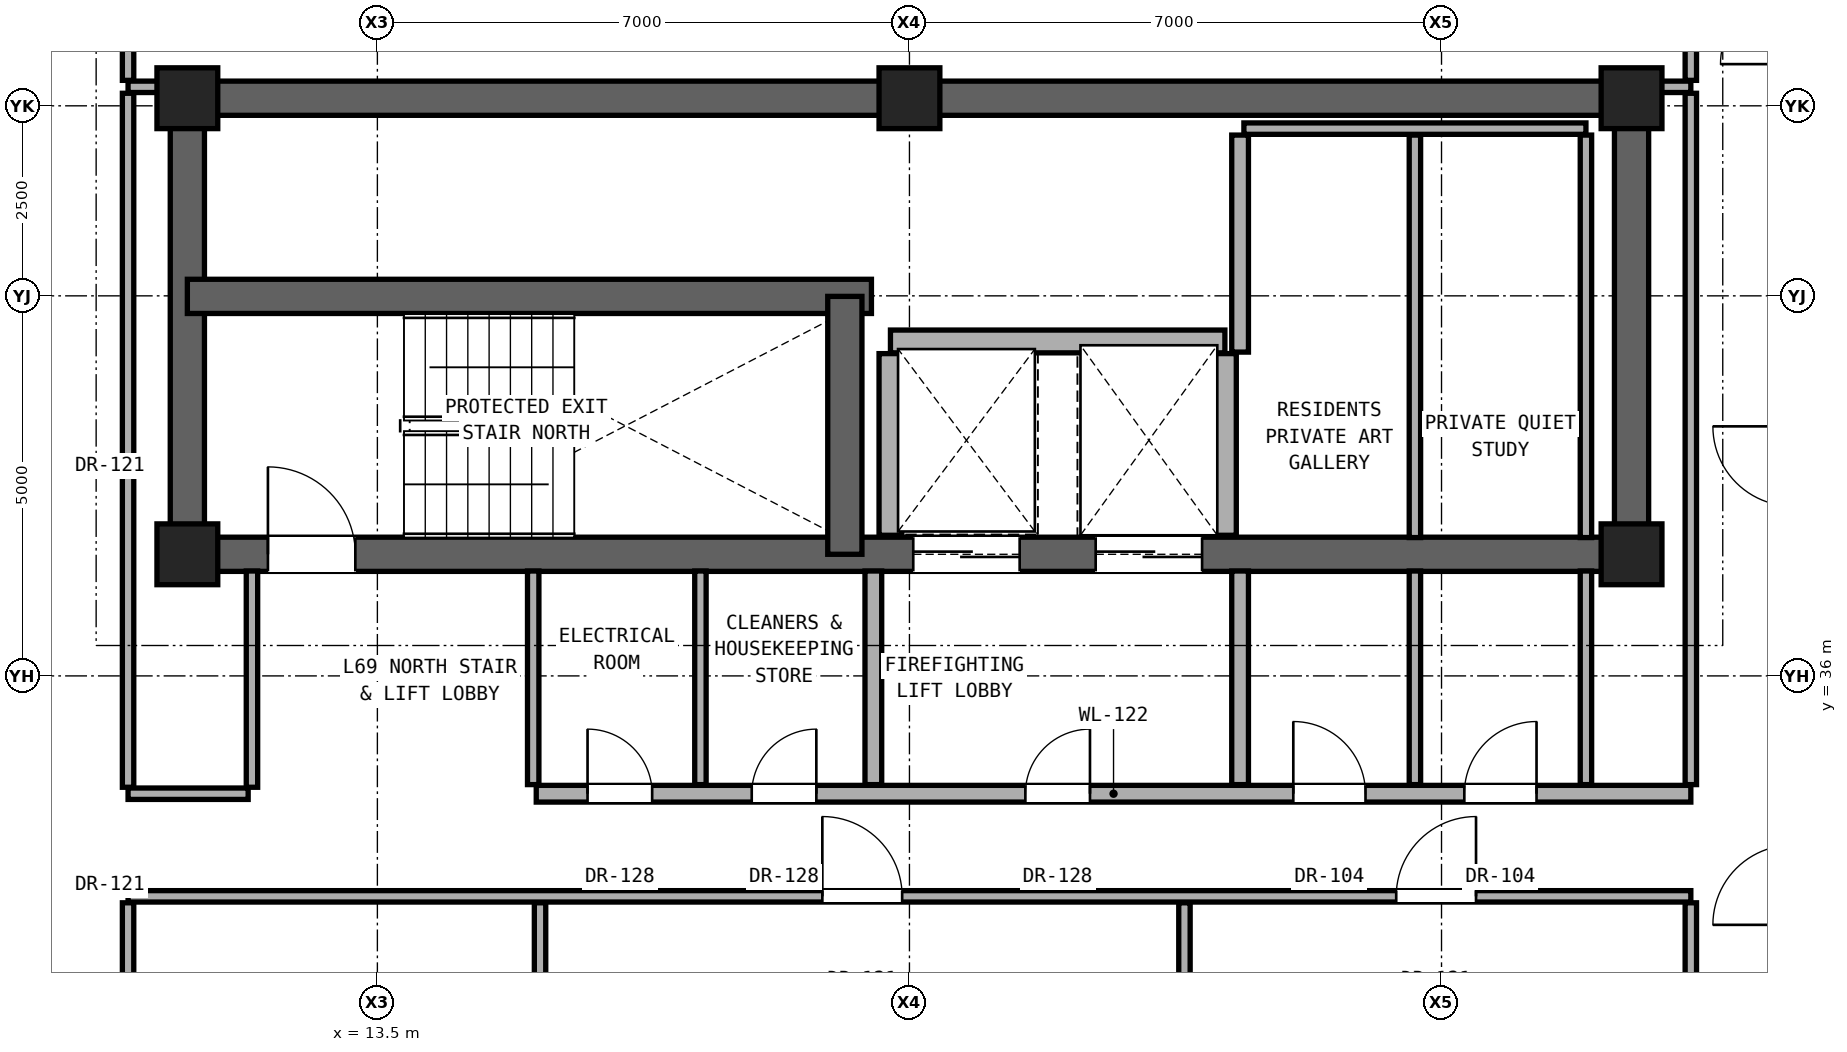
"""IFC4 building model, lengths in metres.
Left out: names, types, materials, properties, quantities, classifications, styles, units other than length and angle.
Written with IfcOpenShell. Run it as: python <this file> out.ifc"""

import sys

from ifc_helpers import new_model, si_unit, direction, frame, frame_2d, origin, origin_2d, place, context, subcontext, project, spatial, rectangle, extrude, element, fill, save


model = new_model("IFC4")
c1 = context("Model", 3, precision=1e-05, world=origin(), true_north=direction((0.0, 1.0)))
c2 = subcontext(c1, "Body", "Model", "MODEL_VIEW")
j1 = project(units=[si_unit("LENGTHUNIT", "METRE"), si_unit("PLANEANGLEUNIT", "RADIAN")], contexts=[c1])
p1 = place(None, origin())
s1 = spatial("IfcSite", under=j1, at=p1, CompositionType="ELEMENT")
p2 = place(p1, origin())
s2 = spatial("IfcBuilding", under=s1, at=p2, CompositionType="ELEMENT")
p3 = place(p2, frame((0.0, 0.0, 242.5)))
s3 = spatial("IfcBuildingStorey", under=s2, at=p3, CompositionType="ELEMENT", Elevation=242.5)
for number, where, z_axis, x_axis in (
    (1, (11.0, 37.6, 0.0), (0.0, 0.0, 1.0), (1.0, 0.0, 0.0)),
    (2, (30.0, 37.6, 0.0), (0.0, 0.0, 1.0), (1.0, 0.0, 0.0)),
    (3, (11.0, 43.6, 0.0), (0.0, 0.0, 1.0), (1.0, 0.0, 0.0)),
    (4, (20.5, 43.6, 0.0), (0.0, 0.0, 1.0), (1.0, 0.0, 0.0)),
    (5, (30.0, 43.6, 0.0), (0.0, 0.0, 1.0), (1.0, 0.0, 0.0)),
):
    element("IfcColumn", number, at=place(p3, frame(where, z_axis=z_axis, x_axis=x_axis)), inside=s3, PredefinedType="COLUMN", context=c2, shape_type="SweptSolid", body=[
        extrude(rectangle(XDim=0.8, YDim=0.8, at=origin_2d()), origin(), (0.0, 0.0, 1.0), 3.3),
    ])
p4 = place(p3, frame((11.0, 43.6, 0.0), z_axis=(0.0, 0.0, 1.0), x_axis=(1.0, 0.0, 0.0)))
e6 = element("IfcWall", 6, at=p4, inside=s3, PredefinedType="SHEAR", context=c2, shape_type="SweptSolid", body=[
    extrude(rectangle(XDim=19.0, YDim=0.45, at=frame_2d((9.5, 0.0))), origin(), (0.0, 0.0, 1.0), 3.1),
])
for number, where, z_axis, x_axis in (
    (7, (11.0, 37.6, 0.0), (0.0, 0.0, 1.0), (0.0, 1.0, 0.0)),
    (8, (30.0, 37.6, 0.0), (0.0, 0.0, 1.0), (0.0, 1.0, 0.0)),
):
    element("IfcWall", number, at=place(p3, frame(where, z_axis=z_axis, x_axis=x_axis)), inside=s3, PredefinedType="SHEAR", context=c2, shape_type="SweptSolid", body=[
        extrude(rectangle(XDim=6.0, YDim=0.45, at=frame_2d((3.0, 0.0))), origin(), (0.0, 0.0, 1.0), 3.1),
    ])
p5 = place(p3, frame((11.0, 37.6, 0.0), z_axis=(0.0, 0.0, 1.0), x_axis=(1.0, 0.0, 0.0)))
e9 = element("IfcWall", 9, at=p5, inside=s3, PredefinedType="SHEAR", context=c2, shape_type="SweptSolid", body=[
    extrude(rectangle(XDim=19.0, YDim=0.45, at=frame_2d((9.5, 0.0))), origin(), (0.0, 0.0, 1.0), 3.1),
])
p6 = place(p5, frame((1.06, 0.0, 0.0)))
e10 = element("IfcOpeningElement", 10, at=p6, cuts=e9, PredefinedType="OPENING", context=c2, shape_type="SweptSolid", body=[
    extrude(rectangle(XDim=1.15, YDim=2.2, at=frame_2d((0.575, 1.1))), frame((0.0, 0.235, 0.0), z_axis=(0.0, -1.0, 0.0), x_axis=(1.0, 0.0, 0.0)), (0.0, 0.0, 1.0), 0.47),
])
p7 = place(p5, frame((9.55, 0.0, 0.0)))
e11 = element("IfcOpeningElement", 11, at=p7, cuts=e9, PredefinedType="OPENING", context=c2, shape_type="SweptSolid", body=[
    extrude(rectangle(XDim=1.4, YDim=2.35, at=frame_2d((0.7, 1.175))), frame((0.0, 0.235, 0.0), z_axis=(0.0, -1.0, 0.0), x_axis=(1.0, 0.0, 0.0)), (0.0, 0.0, 1.0), 0.47),
])
p8 = place(p5, frame((11.95, 0.0, 0.0)))
e12 = element("IfcOpeningElement", 12, at=p8, cuts=e9, PredefinedType="OPENING", context=c2, shape_type="SweptSolid", body=[
    extrude(rectangle(XDim=1.4, YDim=2.35, at=frame_2d((0.7, 1.175))), frame((0.0, 0.235, 0.0), z_axis=(0.0, -1.0, 0.0), x_axis=(1.0, 0.0, 0.0)), (0.0, 0.0, 1.0), 0.47),
])
p9 = place(p3, frame((11.0, 40.993, 0.0), z_axis=(0.0, 0.0, 1.0), x_axis=(1.0, 0.0, 0.0)))
e13 = element("IfcWall", 13, at=p9, inside=s3, PredefinedType="SHEAR", context=c2, shape_type="SweptSolid", body=[
    extrude(rectangle(XDim=9.0, YDim=0.45, at=frame_2d((4.5, 0.0))), origin(), (0.0, 0.0, 1.0), 3.1),
])
p10 = place(p3, frame((19.65, 37.6, 0.0), z_axis=(0.0, 0.0, 1.0), x_axis=(0.0, 1.0, 0.0)))
e14 = element("IfcWall", 14, at=p10, inside=s3, PredefinedType="SHEAR", context=c2, shape_type="SweptSolid", body=[
    extrude(rectangle(XDim=3.393, YDim=0.45, at=frame_2d((1.696, 0.0))), origin(), (0.0, 0.0, 1.0), 3.1),
])
p11 = place(p3, frame((10.22, 33.1, 0.0), z_axis=(0.0, 0.0, 1.0), x_axis=(1.0, 0.0, 0.0)))
e15 = element("IfcWall", 15, at=p11, inside=s3, PredefinedType="PARTITIONING", context=c2, shape_type="SweptSolid", body=[
    extrude(rectangle(XDim=20.56, YDim=0.15, at=frame_2d((10.28, 0.0))), origin(), (0.0, 0.0, 1.0), 2.236),
])
p12 = place(p11, frame((9.134, 0.0, 0.0)))
e16 = element("IfcOpeningElement", 16, at=p12, cuts=e15, PredefinedType="OPENING", context=c2, shape_type="SweptSolid", body=[
    extrude(rectangle(XDim=1.05, YDim=2.2, at=frame_2d((0.525, 1.1))), frame((0.0, 0.085, 0.0), z_axis=(0.0, -1.0, 0.0), x_axis=(1.0, 0.0, 0.0)), (0.0, 0.0, 1.0), 0.17),
])
p13 = place(p11, frame((16.684, 0.0, 0.0)))
e17 = element("IfcOpeningElement", 17, at=p13, cuts=e15, PredefinedType="OPENING", context=c2, shape_type="SweptSolid", body=[
    extrude(rectangle(XDim=1.05, YDim=2.2, at=frame_2d((0.525, 1.1))), frame((0.0, 0.085, 0.0), z_axis=(0.0, -1.0, 0.0), x_axis=(1.0, 0.0, 0.0)), (0.0, 0.0, 1.0), 0.17),
])
p14 = place(p3, frame((10.22, 34.45, 0.0), z_axis=(0.0, 0.0, 1.0), x_axis=(1.0, 0.0, 0.0)))
e18 = element("IfcWall", 18, at=p14, inside=s3, PredefinedType="PARTITIONING", context=c2, shape_type="SweptSolid", body=[
    extrude(rectangle(XDim=1.58, YDim=0.15, at=frame_2d((0.79, 0.0))), origin(), (0.0, 0.0, 1.0), 2.236),
])
p15 = place(p3, frame((15.59, 34.45, 0.0), z_axis=(0.0, 0.0, 1.0), x_axis=(1.0, 0.0, 0.0)))
e19 = element("IfcWall", 19, at=p15, inside=s3, PredefinedType="SOLIDWALL", context=c2, shape_type="SweptSolid", body=[
    extrude(rectangle(XDim=15.19, YDim=0.22, at=frame_2d((7.595, 0.0))), origin(), (0.0, 0.0, 1.0), 2.236),
])
p16 = place(p15, frame((6.435, 0.0, 0.0)))
e20 = element("IfcOpeningElement", 20, at=p16, cuts=e19, PredefinedType="OPENING", context=c2, shape_type="SweptSolid", body=[
    extrude(rectangle(XDim=0.85, YDim=2.01, at=frame_2d((0.425, 1.005))), frame((0.0, 0.12, 0.0), z_axis=(0.0, -1.0, 0.0), x_axis=(1.0, 0.0, 0.0)), (0.0, 0.0, 1.0), 0.24),
])
p17 = place(p15, frame((9.96, 0.0, 0.0)))
e21 = element("IfcOpeningElement", 21, at=p17, cuts=e19, PredefinedType="OPENING", context=c2, shape_type="SweptSolid", body=[
    extrude(rectangle(XDim=0.95, YDim=2.15, at=frame_2d((0.475, 1.075))), frame((0.0, 0.12, 0.0), z_axis=(0.0, -1.0, 0.0), x_axis=(1.0, 0.0, 0.0)), (0.0, 0.0, 1.0), 0.24),
])
p18 = place(p15, frame((12.21, 0.0, 0.0)))
e22 = element("IfcOpeningElement", 22, at=p18, cuts=e19, PredefinedType="OPENING", context=c2, shape_type="SweptSolid", body=[
    extrude(rectangle(XDim=0.95, YDim=2.15, at=frame_2d((0.475, 1.075))), frame((0.0, 0.12, 0.0), z_axis=(0.0, -1.0, 0.0), x_axis=(1.0, 0.0, 0.0)), (0.0, 0.0, 1.0), 0.24),
])
p19 = place(p15, frame((0.675, 0.0, 0.0)))
e23 = element("IfcOpeningElement", 23, at=p19, cuts=e19, PredefinedType="OPENING", context=c2, shape_type="SweptSolid", body=[
    extrude(rectangle(XDim=0.85, YDim=2.01, at=frame_2d((0.425, 1.005))), frame((0.0, 0.12, 0.0), z_axis=(0.0, -1.0, 0.0), x_axis=(1.0, 0.0, 0.0)), (0.0, 0.0, 1.0), 0.24),
])
p20 = place(p15, frame((2.835, 0.0, 0.0)))
e24 = element("IfcOpeningElement", 24, at=p20, cuts=e19, PredefinedType="OPENING", context=c2, shape_type="SweptSolid", body=[
    extrude(rectangle(XDim=0.85, YDim=2.01, at=frame_2d((0.425, 1.005))), frame((0.0, 0.12, 0.0), z_axis=(0.0, -1.0, 0.0), x_axis=(1.0, 0.0, 0.0)), (0.0, 0.0, 1.0), 0.24),
])
p21 = place(p3, frame((20.25, 40.4, 0.0), z_axis=(0.0, 0.0, 1.0), x_axis=(1.0, 0.0, 0.0)))
e25 = element("IfcWall", 25, at=p21, inside=s3, PredefinedType="SOLIDWALL", context=c2, shape_type="SweptSolid", body=[
    extrude(rectangle(XDim=4.4, YDim=0.3, at=frame_2d((2.2, 0.0))), origin(), (0.0, 0.0, 1.0), 3.1),
])
p22 = place(p3, frame((24.9, 43.2, 0.0), z_axis=(0.0, 0.0, 1.0), x_axis=(1.0, 0.0, 0.0)))
e26 = element("IfcWall", 26, at=p22, inside=s3, PredefinedType="PARTITIONING", context=c2, shape_type="SweptSolid", body=[
    extrude(rectangle(XDim=4.5, YDim=0.15, at=frame_2d((2.25, 0.0))), origin(), (0.0, 0.0, 1.0), 3.1),
])
for number, where, z_axis, x_axis in (
    (27, (10.22, 43.75, 0.0), (0.0, 0.0, 1.0), (1.0, 0.0, 0.0)),
    (28, (30.22, 43.75, 0.0), (0.0, 0.0, 1.0), (1.0, 0.0, 0.0)),
):
    element("IfcWall", number, at=place(p3, frame(where, z_axis=z_axis, x_axis=x_axis)), inside=s3, PredefinedType="PARTITIONING", context=c2, shape_type="SweptSolid", body=[
        extrude(rectangle(XDim=0.56, YDim=0.15, at=frame_2d((0.28, 0.0))), origin(), (0.0, 0.0, 1.0), 3.1),
    ])
p23 = place(p3, frame((10.22, 22.935, 0.0), z_axis=(0.0, 0.0, 1.0), x_axis=(0.0, 1.0, 0.0)))
e29 = element("IfcWall", 29, at=p23, inside=s3, PredefinedType="PARTITIONING", context=c2, shape_type="SweptSolid", body=[
    extrude(rectangle(XDim=10.08, YDim=0.15, at=frame_2d((5.04, 0.0))), origin(), (0.0, 0.0, 1.0), 2.396),
])
p24 = place(p23, frame((4.565, 0.0, 0.0)))
e30 = element("IfcOpeningElement", 30, at=p24, cuts=e29, PredefinedType="OPENING", context=c2, shape_type="SweptSolid", body=[
    extrude(rectangle(XDim=0.95, YDim=2.15, at=frame_2d((0.475, 1.075))), frame((0.0, 0.085, 0.0), z_axis=(0.0, -1.0, 0.0), x_axis=(1.0, 0.0, 0.0)), (0.0, 0.0, 1.0), 0.17),
])
p25 = place(p3, frame((10.22, 34.535, 0.0), z_axis=(0.0, 0.0, 1.0), x_axis=(0.0, 1.0, 0.0)))
e31 = element("IfcWall", 31, at=p25, inside=s3, PredefinedType="PARTITIONING", context=c2, shape_type="SweptSolid", body=[
    extrude(rectangle(XDim=9.13, YDim=0.15, at=frame_2d((4.565, 0.0))), origin(), (0.0, 0.0, 1.0), 2.492),
])
p26 = place(p3, frame((10.22, 43.835, 0.0), z_axis=(0.0, 0.0, 1.0), x_axis=(0.0, 1.0, 0.0)))
e32 = element("IfcWall", 32, at=p26, inside=s3, PredefinedType="PARTITIONING", context=c2, shape_type="SweptSolid", body=[
    extrude(rectangle(XDim=3.291, YDim=0.15, at=frame_2d((1.646, 0.0))), origin(), (0.0, 0.0, 1.0), 3.1),
])
p27 = place(p3, frame((11.85, 34.535, 0.0), z_axis=(0.0, 0.0, 1.0), x_axis=(0.0, 1.0, 0.0)))
e33 = element("IfcWall", 33, at=p27, inside=s3, PredefinedType="PARTITIONING", context=c2, shape_type="SweptSolid", body=[
    extrude(rectangle(XDim=2.845, YDim=0.15, at=frame_2d((1.422, 0.0))), origin(), (0.0, 0.0, 1.0), 3.1),
])
p28 = place(p3, frame((15.64, 25.925, 0.0), z_axis=(0.0, 0.0, 1.0), x_axis=(0.0, 1.0, 0.0)))
e34 = element("IfcWall", 34, at=p28, inside=s3, PredefinedType="PARTITIONING", context=c2, shape_type="SweptSolid", body=[
    extrude(rectangle(XDim=7.09, YDim=0.15, at=frame_2d((3.545, 0.0))), origin(), (0.0, 0.0, 1.0), 2.236),
])
for number, where, z_axis, x_axis in (
    (35, (15.55, 34.57, 0.0), (0.0, 0.0, 1.0), (0.0, 1.0, 0.0)),
    (36, (17.75, 34.57, 0.0), (0.0, 0.0, 1.0), (0.0, 1.0, 0.0)),
):
    element("IfcWall", number, at=place(p3, frame(where, z_axis=z_axis, x_axis=x_axis)), inside=s3, PredefinedType="PARTITIONING", context=c2, shape_type="SweptSolid", body=[
        extrude(rectangle(XDim=2.81, YDim=0.15, at=frame_2d((1.405, 0.0))), origin(), (0.0, 0.0, 1.0), 3.1),
    ])
p29 = place(p3, frame((20.025, 34.57, 0.0), z_axis=(0.0, 0.0, 1.0), x_axis=(0.0, 1.0, 0.0)))
e37 = element("IfcWall", 37, at=p29, inside=s3, PredefinedType="SOLIDWALL", context=c2, shape_type="SweptSolid", body=[
    extrude(rectangle(XDim=2.81, YDim=0.22, at=frame_2d((1.405, 0.0))), origin(), (0.0, 0.0, 1.0), 3.1),
])
p30 = place(p3, frame((20.25, 37.85, 0.0), z_axis=(0.0, 0.0, 1.0), x_axis=(0.0, 1.0, 0.0)))
e38 = element("IfcWall", 38, at=p30, inside=s3, PredefinedType="SOLIDWALL", context=c2, shape_type="SweptSolid", body=[
    extrude(rectangle(XDim=2.39, YDim=0.3, at=frame_2d((1.195, 0.0))), origin(), (0.0, 0.0, 1.0), 3.1),
])
p31 = place(p3, frame((24.118, 25.925, 0.0), z_axis=(0.0, 0.0, 1.0), x_axis=(0.0, 1.0, 0.0)))
e39 = element("IfcWall", 39, at=p31, inside=s3, PredefinedType="PARTITIONING", context=c2, shape_type="SweptSolid", body=[
    extrude(rectangle(XDim=7.09, YDim=0.15, at=frame_2d((3.545, 0.0))), origin(), (0.0, 0.0, 1.0), 2.236),
])
p32 = place(p3, frame((24.65, 37.85, 0.0), z_axis=(0.0, 0.0, 1.0), x_axis=(0.0, 1.0, 0.0)))
e40 = element("IfcWall", 40, at=p32, inside=s3, PredefinedType="SOLIDWALL", context=c2, shape_type="SweptSolid", body=[
    extrude(rectangle(XDim=2.39, YDim=0.3, at=frame_2d((1.195, 0.0))), origin(), (0.0, 0.0, 1.0), 3.1),
])
p33 = place(p3, frame((24.85, 34.57, 0.0), z_axis=(0.0, 0.0, 1.0), x_axis=(0.0, 1.0, 0.0)))
e41 = element("IfcWall", 41, at=p33, inside=s3, PredefinedType="SOLIDWALL", context=c2, shape_type="SweptSolid", body=[
    extrude(rectangle(XDim=2.81, YDim=0.22, at=frame_2d((1.405, 0.0))), origin(), (0.0, 0.0, 1.0), 3.1),
])
p34 = place(p3, frame((24.85, 40.26, 0.0), z_axis=(0.0, 0.0, 1.0), x_axis=(0.0, 1.0, 0.0)))
e42 = element("IfcWall", 42, at=p34, inside=s3, PredefinedType="SOLIDWALL", context=c2, shape_type="SweptSolid", body=[
    extrude(rectangle(XDim=2.855, YDim=0.22, at=frame_2d((1.427, 0.0))), origin(), (0.0, 0.0, 1.0), 3.1),
])
p35 = place(p3, frame((27.15, 34.57, 0.0), z_axis=(0.0, 0.0, 1.0), x_axis=(0.0, 1.0, 0.0)))
e43 = element("IfcWall", 43, at=p35, inside=s3, PredefinedType="PARTITIONING", context=c2, shape_type="SweptSolid", body=[
    extrude(rectangle(XDim=2.81, YDim=0.15, at=frame_2d((1.405, 0.0))), origin(), (0.0, 0.0, 1.0), 3.1),
])
p36 = place(p3, frame((27.15, 37.82, 0.0), z_axis=(0.0, 0.0, 1.0), x_axis=(0.0, 1.0, 0.0)))
e44 = element("IfcWall", 44, at=p36, inside=s3, PredefinedType="PARTITIONING", context=c2, shape_type="SweptSolid", body=[
    extrude(rectangle(XDim=5.295, YDim=0.15, at=frame_2d((2.647, 0.0))), origin(), (0.0, 0.0, 1.0), 3.1),
])
p37 = place(p3, frame((29.4, 34.57, 0.0), z_axis=(0.0, 0.0, 1.0), x_axis=(0.0, 1.0, 0.0)))
e45 = element("IfcWall", 45, at=p37, inside=s3, PredefinedType="PARTITIONING", context=c2, shape_type="SweptSolid", body=[
    extrude(rectangle(XDim=2.81, YDim=0.15, at=frame_2d((1.405, 0.0))), origin(), (0.0, 0.0, 1.0), 3.1),
])
p38 = place(p3, frame((29.4, 37.82, 0.0), z_axis=(0.0, 0.0, 1.0), x_axis=(0.0, 1.0, 0.0)))
e46 = element("IfcWall", 46, at=p38, inside=s3, PredefinedType="PARTITIONING", context=c2, shape_type="SweptSolid", body=[
    extrude(rectangle(XDim=5.295, YDim=0.15, at=frame_2d((2.647, 0.0))), origin(), (0.0, 0.0, 1.0), 3.1),
])
p39 = place(p3, frame((30.78, 25.925, 0.0), z_axis=(0.0, 0.0, 1.0), x_axis=(0.0, 1.0, 0.0)))
e47 = element("IfcWall", 47, at=p39, inside=s3, PredefinedType="PARTITIONING", context=c2, shape_type="SweptSolid", body=[
    extrude(rectangle(XDim=7.09, YDim=0.15, at=frame_2d((3.545, 0.0))), origin(), (0.0, 0.0, 1.0), 2.396),
])
p40 = place(p3, frame((30.78, 34.57, 0.0), z_axis=(0.0, 0.0, 1.0), x_axis=(0.0, 1.0, 0.0)))
e48 = element("IfcWall", 48, at=p40, inside=s3, PredefinedType="PARTITIONING", context=c2, shape_type="SweptSolid", body=[
    extrude(rectangle(XDim=9.095, YDim=0.15, at=frame_2d((4.547, 0.0))), origin(), (0.0, 0.0, 1.0), 2.492),
])
p41 = place(p3, frame((30.78, 43.835, 0.0), z_axis=(0.0, 0.0, 1.0), x_axis=(0.0, 1.0, 0.0)))
e49 = element("IfcWall", 49, at=p41, inside=s3, PredefinedType="PARTITIONING", context=c2, shape_type="SweptSolid", body=[
    extrude(rectangle(XDim=3.291, YDim=0.15, at=frame_2d((1.646, 0.0))), origin(), (0.0, 0.0, 1.0), 3.1),
])
p42 = place(p41, frame((1.121, 0.0, 0.0)))
e50 = element("IfcOpeningElement", 50, at=p42, cuts=e49, PredefinedType="OPENING", context=c2, shape_type="SweptSolid", body=[
    extrude(rectangle(XDim=1.05, YDim=2.2, at=frame_2d((0.525, 1.1))), frame((0.0, 0.085, 0.0), z_axis=(0.0, -1.0, 0.0), x_axis=(1.0, 0.0, 0.0)), (0.0, 0.0, 1.0), 0.17),
])
p43 = place(p6, origin())
e51 = element("IfcDoor", 51, at=p43, inside=s3, OperationType="SINGLE_SWING_LEFT", PredefinedType="DOOR", context=c2, shape_type="SweptSolid", body=[
    extrude(rectangle(XDim=1.15, YDim=2.2, at=frame_2d((0.575, 1.1))), frame((0.0, 0.025, 0.0), z_axis=(0.0, -1.0, 0.0), x_axis=(1.0, 0.0, 0.0)), (0.0, 0.0, 1.0), 0.05),
])
fill(e10, e51)
p44 = place(p16, origin())
e52 = element("IfcDoor", 52, at=p44, inside=s3, OperationType="SINGLE_SWING_RIGHT", PredefinedType="DOOR", context=c2, shape_type="SweptSolid", body=[
    extrude(rectangle(XDim=0.85, YDim=2.01, at=frame_2d((0.425, 1.005))), frame((0.0, 0.025, 0.0), z_axis=(0.0, -1.0, 0.0), x_axis=(1.0, 0.0, 0.0)), (0.0, 0.0, 1.0), 0.05),
])
fill(e20, e52)
p45 = place(p17, origin())
e53 = element("IfcDoor", 53, at=p45, inside=s3, OperationType="SINGLE_SWING_LEFT", PredefinedType="DOOR", context=c2, shape_type="SweptSolid", body=[
    extrude(rectangle(XDim=0.95, YDim=2.15, at=frame_2d((0.475, 1.075))), frame((0.0, 0.025, 0.0), z_axis=(0.0, -1.0, 0.0), x_axis=(1.0, 0.0, 0.0)), (0.0, 0.0, 1.0), 0.05),
])
fill(e21, e53)
p46 = place(p18, origin())
e54 = element("IfcDoor", 54, at=p46, inside=s3, OperationType="SINGLE_SWING_RIGHT", PredefinedType="DOOR", context=c2, shape_type="SweptSolid", body=[
    extrude(rectangle(XDim=0.95, YDim=2.15, at=frame_2d((0.475, 1.075))), frame((0.0, 0.025, 0.0), z_axis=(0.0, -1.0, 0.0), x_axis=(1.0, 0.0, 0.0)), (0.0, 0.0, 1.0), 0.05),
])
fill(e22, e54)
p47 = place(p19, origin())
e55 = element("IfcDoor", 55, at=p47, inside=s3, OperationType="SINGLE_SWING_LEFT", PredefinedType="DOOR", context=c2, shape_type="SweptSolid", body=[
    extrude(rectangle(XDim=0.85, YDim=2.01, at=frame_2d((0.425, 1.005))), frame((0.0, 0.025, 0.0), z_axis=(0.0, -1.0, 0.0), x_axis=(1.0, 0.0, 0.0)), (0.0, 0.0, 1.0), 0.05),
])
fill(e23, e55)
p48 = place(p20, origin())
e56 = element("IfcDoor", 56, at=p48, inside=s3, OperationType="SINGLE_SWING_RIGHT", PredefinedType="DOOR", context=c2, shape_type="SweptSolid", body=[
    extrude(rectangle(XDim=0.85, YDim=2.01, at=frame_2d((0.425, 1.005))), frame((0.0, 0.025, 0.0), z_axis=(0.0, -1.0, 0.0), x_axis=(1.0, 0.0, 0.0)), (0.0, 0.0, 1.0), 0.05),
])
fill(e24, e56)
p49 = place(p12, origin())
e57 = element("IfcDoor", 57, at=p49, inside=s3, OperationType="SINGLE_SWING_LEFT", PredefinedType="DOOR", context=c2, shape_type="SweptSolid", body=[
    extrude(rectangle(XDim=1.05, YDim=2.2, at=frame_2d((0.525, 1.1))), frame((0.0, 0.025, 0.0), z_axis=(0.0, -1.0, 0.0), x_axis=(1.0, 0.0, 0.0)), (0.0, 0.0, 1.0), 0.05),
])
fill(e16, e57)
p50 = place(p13, origin())
e58 = element("IfcDoor", 58, at=p50, inside=s3, OperationType="SINGLE_SWING_RIGHT", PredefinedType="DOOR", context=c2, shape_type="SweptSolid", body=[
    extrude(rectangle(XDim=1.05, YDim=2.2, at=frame_2d((0.525, 1.1))), frame((0.0, 0.025, 0.0), z_axis=(0.0, -1.0, 0.0), x_axis=(1.0, 0.0, 0.0)), (0.0, 0.0, 1.0), 0.05),
])
fill(e17, e58)
p51 = place(p7, origin())
e59 = element("IfcDoor", 59, at=p51, inside=s3, OperationType="DOUBLE_DOOR_SLIDING", PredefinedType="DOOR", context=c2, shape_type="SweptSolid", body=[
    extrude(rectangle(XDim=1.4, YDim=2.35, at=frame_2d((0.7, 1.175))), frame((0.0, 0.025, 0.0), z_axis=(0.0, -1.0, 0.0), x_axis=(1.0, 0.0, 0.0)), (0.0, 0.0, 1.0), 0.05),
])
fill(e11, e59)
p52 = place(p8, origin())
e60 = element("IfcDoor", 60, at=p52, inside=s3, OperationType="DOUBLE_DOOR_SLIDING", PredefinedType="DOOR", context=c2, shape_type="SweptSolid", body=[
    extrude(rectangle(XDim=1.4, YDim=2.35, at=frame_2d((0.7, 1.175))), frame((0.0, 0.025, 0.0), z_axis=(0.0, -1.0, 0.0), x_axis=(1.0, 0.0, 0.0)), (0.0, 0.0, 1.0), 0.05),
])
fill(e12, e60)
save(model, sys.argv[1])
